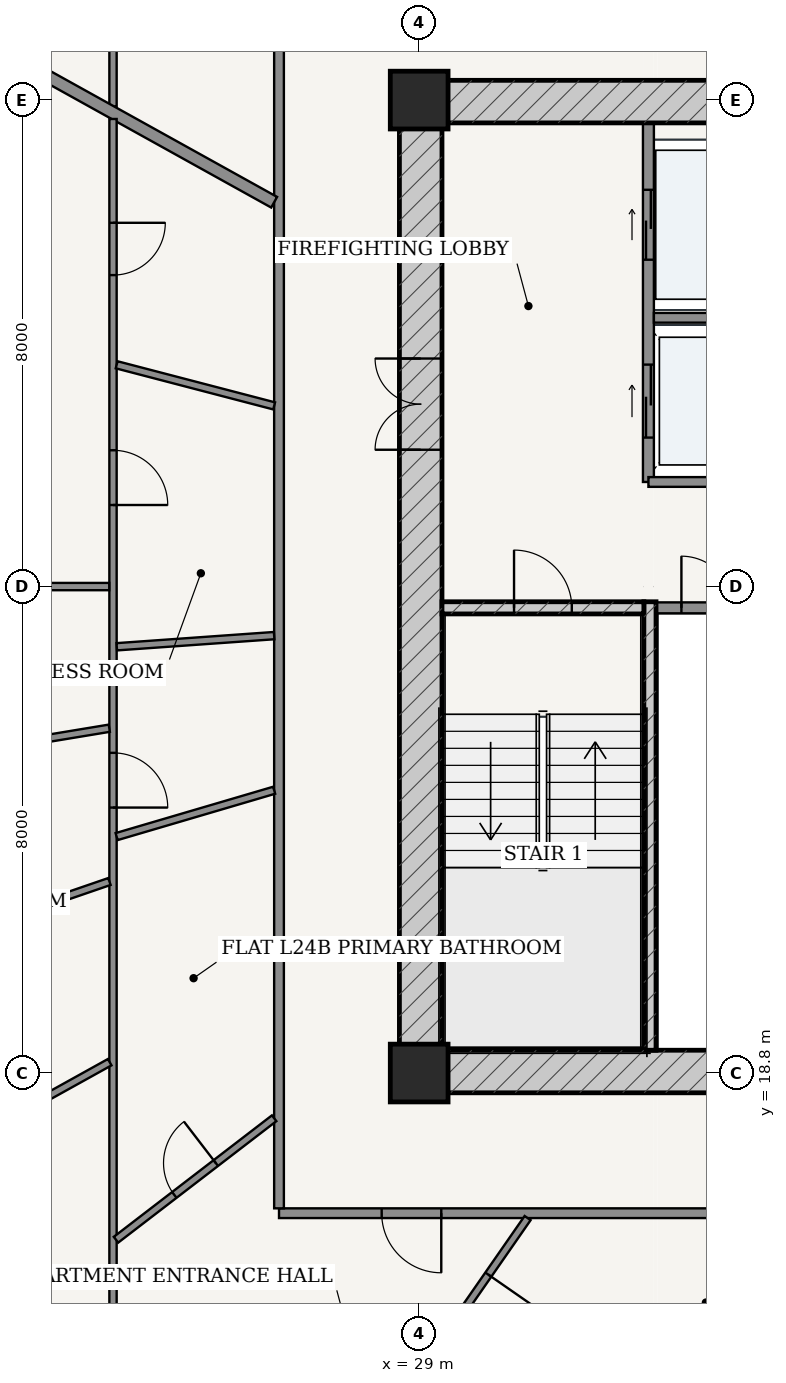
"""IFC4 building model, lengths in metres.
Left out: names, types, materials, properties, quantities, classifications, styles, units other than length and angle.
Written with IfcOpenShell. Run it as: python <this file> out.ifc"""

import sys

from ifc_helpers import new_model, si_unit, direction, frame, frame_2d, origin, origin_2d, place, context, subcontext, project, spatial, rectangle, extrude, source, transform, mapped, element, fill, save


model = new_model("IFC4")
c1 = context("Model", 3, precision=1e-05, world=origin(), true_north=direction((-0.2419218956, 0.970295726276)))
c2 = subcontext(c1, "Body", "Model", "MODEL_VIEW")
j1 = project(units=[si_unit("LENGTHUNIT", "METRE"), si_unit("PLANEANGLEUNIT", "RADIAN")], contexts=[c1])
p1 = place(None, origin())
s1 = spatial("IfcSite", under=j1, at=p1, CompositionType="ELEMENT")
p2 = place(p1, origin())
s2 = spatial("IfcBuilding", under=s1, at=p2, CompositionType="ELEMENT")
p3 = place(p2, frame((0.0, 0.0, 94.2)))
s3 = spatial("IfcBuildingStorey", under=s2, at=p3, CompositionType="ELEMENT", Elevation=94.2)
for number, where, z_axis, x_axis in (
    (1, (29.0, 18.8, 0.0), (0.0, 0.0, 1.0), (1.0, 0.0, 0.0)),
    (2, (29.0, 34.8, 0.0), (0.0, 0.0, 1.0), (1.0, 0.0, 0.0)),
):
    element("IfcColumn", number, at=place(p3, frame(where, z_axis=z_axis, x_axis=x_axis)), inside=s3, PredefinedType="COLUMN", context=c2, shape_type="SweptSolid", body=[
        extrude(rectangle(XDim=0.95, YDim=0.95, at=origin_2d()), origin(), (0.0, 0.0, 1.0), 3.6),
    ])
p4 = place(p3, frame((28.675, 18.825, 0.0), z_axis=(0.0, 0.0, 1.0), x_axis=(1.0, 0.0, 0.0)))
e3 = element("IfcWall", 3, at=p4, inside=s3, PredefinedType="SHEAR", context=c2, shape_type="SweptSolid", body=[
    extrude(rectangle(XDim=18.65, YDim=0.7, at=frame_2d((9.325, 0.0))), origin(), (0.0, 0.0, 1.0), 3.325),
])
p5 = place(p4, frame((8.9, 0.0, 0.0)))
e4 = element("IfcOpeningElement", 4, at=p5, cuts=e3, PredefinedType="OPENING", context=c2, shape_type="SweptSolid", body=[
    extrude(rectangle(XDim=0.85, YDim=2.1, at=frame_2d((0.425, 1.05))), frame((0.0, 0.36, 0.0), z_axis=(0.0, -1.0, 0.0), x_axis=(1.0, 0.0, 0.0)), (0.0, 0.0, 1.0), 0.72),
])
p6 = place(p3, frame((28.675, 34.775, 0.0), z_axis=(0.0, 0.0, 1.0), x_axis=(1.0, 0.0, 0.0)))
e5 = element("IfcWall", 5, at=p6, inside=s3, PredefinedType="SHEAR", context=c2, shape_type="SweptSolid", body=[
    extrude(rectangle(XDim=18.65, YDim=0.7, at=frame_2d((9.325, 0.0))), origin(), (0.0, 0.0, 1.0), 3.325),
])
p7 = place(p6, frame((8.9, 0.0, 0.0)))
e6 = element("IfcOpeningElement", 6, at=p7, cuts=e5, PredefinedType="OPENING", context=c2, shape_type="SweptSolid", body=[
    extrude(rectangle(XDim=0.85, YDim=2.1, at=frame_2d((0.425, 1.05))), frame((0.0, 0.36, 0.0), z_axis=(0.0, -1.0, 0.0), x_axis=(1.0, 0.0, 0.0)), (0.0, 0.0, 1.0), 0.72),
])
p8 = place(p3, frame((29.025, 19.175, 0.0), z_axis=(0.0, 0.0, 1.0), x_axis=(0.0, 1.0, 0.0)))
e7 = element("IfcWall", 7, at=p8, inside=s3, PredefinedType="SHEAR", context=c2, shape_type="SweptSolid", body=[
    extrude(rectangle(XDim=15.25, YDim=0.7, at=frame_2d((7.625, 0.0))), origin(), (0.0, 0.0, 1.0), 3.325),
])
p9 = place(p8, frame((9.875, 0.0, 0.0)))
e8 = element("IfcOpeningElement", 8, at=p9, cuts=e7, PredefinedType="OPENING", context=c2, shape_type="SweptSolid", body=[
    extrude(rectangle(XDim=1.5, YDim=2.2, at=frame_2d((0.75, 1.1))), frame((0.0, 0.36, 0.0), z_axis=(0.0, -1.0, 0.0), x_axis=(1.0, 0.0, 0.0)), (0.0, 0.0, 1.0), 0.72),
])
p10 = place(p3, frame((32.795, 19.175, 0.0), z_axis=(0.0, 0.0, 1.0), x_axis=(0.0, 1.0, 0.0)))
e9 = element("IfcWall", 9, at=p10, inside=s3, PredefinedType="SOLIDWALL", context=c2, shape_type="SweptSolid", body=[
    extrude(rectangle(XDim=7.375, YDim=0.2, at=frame_2d((3.688, 0.0))), origin(), (0.0, 0.0, 1.0), 3.325),
])
p11 = place(p3, frame((29.375, 26.45, 0.0), z_axis=(0.0, 0.0, 1.0), x_axis=(1.0, 0.0, 0.0)))
e10 = element("IfcWall", 10, at=p11, inside=s3, PredefinedType="SOLIDWALL", context=c2, shape_type="SweptSolid", body=[
    extrude(rectangle(XDim=3.32, YDim=0.2, at=frame_2d((1.66, 0.0))), origin(), (0.0, 0.0, 1.0), 3.325),
])
p12 = place(p11, frame((1.185, 0.0, 0.0)))
e11 = element("IfcOpeningElement", 11, at=p12, cuts=e10, PredefinedType="OPENING", context=c2, shape_type="SweptSolid", body=[
    extrude(rectangle(XDim=0.95, YDim=2.15, at=frame_2d((0.475, 1.075))), frame((0.0, 0.11, 0.0), z_axis=(0.0, -1.0, 0.0), x_axis=(1.0, 0.0, 0.0)), (0.0, 0.0, 1.0), 0.22),
])
p13 = place(p3, frame((32.9, 26.45, 0.0), z_axis=(0.0, 0.0, 1.0), x_axis=(1.0, 0.0, 0.0)))
e12 = element("IfcWall", 12, at=p13, inside=s3, PredefinedType="PARTITIONING", context=c2, shape_type="SweptSolid", body=[
    extrude(rectangle(XDim=1.675, YDim=0.18, at=frame_2d((0.837, 0.0))), origin(), (0.0, 0.0, 1.0), 3.325),
])
p14 = place(p13, frame((0.413, 0.0, 0.0)))
e13 = element("IfcOpeningElement", 13, at=p14, cuts=e12, PredefinedType="OPENING", context=c2, shape_type="SweptSolid", body=[
    extrude(rectangle(XDim=0.85, YDim=2.1, at=frame_2d((0.425, 1.05))), frame((0.0, 0.1, 0.0), z_axis=(0.0, -1.0, 0.0), x_axis=(1.0, 0.0, 0.0)), (0.0, 0.0, 1.0), 0.2),
])
p15 = place(p3, frame((32.77, 28.52, 0.0), z_axis=(0.0, 0.0, 1.0), x_axis=(0.0, 1.0, 0.0)))
e14 = element("IfcWall", 14, at=p15, inside=s3, PredefinedType="PARTITIONING", context=c2, shape_type="SweptSolid", body=[
    extrude(rectangle(XDim=5.905, YDim=0.18, at=frame_2d((2.953, 0.0))), origin(), (0.0, 0.0, 1.0), 3.325),
])
p16 = place(p15, frame((3.655, 0.0, 0.0)))
e15 = element("IfcOpeningElement", 15, at=p16, cuts=e14, PredefinedType="OPENING", context=c2, shape_type="SweptSolid", body=[
    extrude(rectangle(XDim=1.15, YDim=2.2, at=frame_2d((0.575, 1.1))), frame((0.0, 0.1, 0.0), z_axis=(0.0, -1.0, 0.0), x_axis=(1.0, 0.0, 0.0)), (0.0, 0.0, 1.0), 0.2),
])
p17 = place(p15, frame((0.73, 0.0, 0.0)))
e16 = element("IfcOpeningElement", 16, at=p17, cuts=e14, PredefinedType="OPENING", context=c2, shape_type="SweptSolid", body=[
    extrude(rectangle(XDim=1.2, YDim=2.25, at=frame_2d((0.6, 1.125))), frame((0.0, 0.1, 0.0), z_axis=(0.0, -1.0, 0.0), x_axis=(1.0, 0.0, 0.0)), (0.0, 0.0, 1.0), 0.2),
])
p18 = place(p3, frame((32.86, 31.22, 0.0), z_axis=(0.0, 0.0, 1.0), x_axis=(1.0, 0.0, 0.0)))
e17 = element("IfcWall", 17, at=p18, inside=s3, PredefinedType="PARTITIONING", context=c2, shape_type="SweptSolid", body=[
    extrude(rectangle(XDim=1.715, YDim=0.16, at=frame_2d((0.857, 0.0))), origin(), (0.0, 0.0, 1.0), 3.325),
])
p19 = place(p3, frame((32.77, 28.52, 0.0), z_axis=(0.0, 0.0, 1.0), x_axis=(1.0, 0.0, 0.0)))
e18 = element("IfcWall", 18, at=p19, inside=s3, PredefinedType="PARTITIONING", context=c2, shape_type="SweptSolid", body=[
    extrude(rectangle(XDim=1.805, YDim=0.16, at=frame_2d((0.902, 0.0))), origin(), (0.0, 0.0, 1.0), 3.325),
])
p20 = place(p3, frame((26.695, 16.495, 0.0), z_axis=(0.0, 0.0, 1.0), x_axis=(1.0, 0.0, 0.0)))
e19 = element("IfcWall", 19, at=p20, inside=s3, PredefinedType="PARTITIONING", context=c2, shape_type="SweptSolid", body=[
    extrude(rectangle(XDim=22.61, YDim=0.16, at=frame_2d((11.305, 0.0))), origin(), (0.0, 0.0, 1.0), 2.767),
])
p21 = place(p20, frame((1.688, 0.0, 0.0)))
e20 = element("IfcOpeningElement", 20, at=p21, cuts=e19, PredefinedType="OPENING", context=c2, shape_type="SweptSolid", body=[
    extrude(rectangle(XDim=0.98, YDim=2.2, at=frame_2d((0.49, 1.1))), frame((0.0, 0.09, 0.0), z_axis=(0.0, -1.0, 0.0), x_axis=(1.0, 0.0, 0.0)), (0.0, 0.0, 1.0), 0.18),
])
p22 = place(p20, frame((16.137, 0.0, 0.0)))
e21 = element("IfcOpeningElement", 21, at=p22, cuts=e19, PredefinedType="OPENING", context=c2, shape_type="SweptSolid", body=[
    extrude(rectangle(XDim=0.98, YDim=2.2, at=frame_2d((0.49, 1.1))), frame((0.0, 0.09, 0.0), z_axis=(0.0, -1.0, 0.0), x_axis=(1.0, 0.0, 0.0)), (0.0, 0.0, 1.0), 0.18),
])
p23 = place(p3, frame((26.695, 16.575, 0.0), z_axis=(0.0, 0.0, 1.0), x_axis=(0.0, 1.0, 0.0)))
e22 = element("IfcWall", 22, at=p23, inside=s3, PredefinedType="PARTITIONING", context=c2, shape_type="SweptSolid", body=[
    extrude(rectangle(XDim=20.45, YDim=0.16, at=frame_2d((10.225, 0.0))), origin(), (0.0, 0.0, 1.0), 2.767),
])
p24 = place(p3, frame((23.965, 34.693, 0.0), z_axis=(0.0, 0.0, 1.0), x_axis=(0.0, 1.0, 0.0)))
e23 = element("IfcWall", 23, at=p24, inside=s3, PredefinedType="PARTITIONING", context=c2, shape_type="SweptSolid", body=[
    extrude(rectangle(XDim=5.142, YDim=0.12, at=frame_2d((2.571, 0.0))), origin(), (0.0, 0.0, 1.0), 3.004),
])
p25 = place(p3, frame((26.615, 33.12, 0.0), z_axis=(0.0, 0.0, 1.0), x_axis=(-0.874319192772, 0.485351366692, 0.0)))
e24 = element("IfcWall", 24, at=p25, inside=s3, PredefinedType="PARTITIONING", context=c2, shape_type="SweptSolid", body=[
    extrude(rectangle(XDim=12.158, YDim=0.2, at=frame_2d((6.079, 0.0))), origin(), (0.0, 0.0, 1.0), 2.767),
])
p26 = place(p3, frame((23.965, 13.765, 0.0), z_axis=(0.0, 0.0, 1.0), x_axis=(0.0, 1.0, 0.0)))
e25 = element("IfcWall", 25, at=p26, inside=s3, PredefinedType="PARTITIONING", context=c2, shape_type="SweptSolid", body=[
    extrude(rectangle(XDim=20.725, YDim=0.12, at=frame_2d((10.362, 0.0))), origin(), (0.0, 0.0, 1.0), 2.767),
])
p27 = place(p26, frame((9.401, 0.0, 0.0)))
e26 = element("IfcOpeningElement", 26, at=p27, cuts=e25, PredefinedType="OPENING", context=c2, shape_type="SweptSolid", body=[
    extrude(rectangle(XDim=0.9, YDim=2.15, at=frame_2d((0.45, 1.075))), frame((0.0, 0.07, 0.0), z_axis=(0.0, -1.0, 0.0), x_axis=(1.0, 0.0, 0.0)), (0.0, 0.0, 1.0), 0.14),
])
p28 = place(p26, frame((18.157, 0.0, 0.0)))
e27 = element("IfcOpeningElement", 27, at=p28, cuts=e25, PredefinedType="OPENING", context=c2, shape_type="SweptSolid", body=[
    extrude(rectangle(XDim=0.86, YDim=2.15, at=frame_2d((0.43, 1.075))), frame((0.0, 0.07, 0.0), z_axis=(0.0, -1.0, 0.0), x_axis=(1.0, 0.0, 0.0)), (0.0, 0.0, 1.0), 0.14),
])
p29 = place(p26, frame((14.376, 0.0, 0.0)))
e28 = element("IfcOpeningElement", 28, at=p29, cuts=e25, PredefinedType="OPENING", context=c2, shape_type="SweptSolid", body=[
    extrude(rectangle(XDim=0.9, YDim=2.15, at=frame_2d((0.45, 1.075))), frame((0.0, 0.07, 0.0), z_axis=(0.0, -1.0, 0.0), x_axis=(1.0, 0.0, 0.0)), (0.0, 0.0, 1.0), 0.14),
])
p30 = place(p3, frame((23.903, 26.8, 0.0), z_axis=(0.0, 0.0, 1.0), x_axis=(-1.0, 0.0, 0.0)))
e29 = element("IfcWall", 29, at=p30, inside=s3, PredefinedType="PARTITIONING", context=c2, shape_type="SweptSolid", body=[
    extrude(rectangle(XDim=12.443, YDim=0.12, at=frame_2d((6.222, 0.0))), origin(), (0.0, 0.0, 1.0), 2.767),
])
p31 = place(p30, frame((5.771, 0.0, 0.0)))
e30 = element("IfcOpeningElement", 30, at=p31, cuts=e29, PredefinedType="OPENING", context=c2, shape_type="SweptSolid", body=[
    extrude(rectangle(XDim=0.9, YDim=2.15, at=frame_2d((0.45, 1.075))), frame((0.0, 0.07, 0.0), z_axis=(0.0, -1.0, 0.0), x_axis=(1.0, 0.0, 0.0)), (0.0, 0.0, 1.0), 0.14),
])
p32 = place(p3, frame((23.904, 24.47, 0.0), z_axis=(0.0, 0.0, 1.0), x_axis=(-0.986618264768, -0.163047231274, 0.0)))
e31 = element("IfcWall", 31, at=p32, inside=s3, PredefinedType="PARTITIONING", context=c2, shape_type="SweptSolid", body=[
    extrude(rectangle(XDim=12.039, YDim=0.12, at=frame_2d((6.02, 0.0))), origin(), (0.0, 0.0, 1.0), 2.767),
])
p33 = place(p32, frame((4.496, 0.0, 0.0)))
e32 = element("IfcOpeningElement", 32, at=p33, cuts=e31, PredefinedType="OPENING", context=c2, shape_type="SweptSolid", body=[
    extrude(rectangle(XDim=0.9, YDim=2.15, at=frame_2d((0.45, 1.075))), frame((0.0, 0.07, 0.0), z_axis=(0.0, -1.0, 0.0), x_axis=(1.0, 0.0, 0.0)), (0.0, 0.0, 1.0), 0.14),
])
p34 = place(p3, frame((23.906, 21.95, 0.0), z_axis=(0.0, 0.0, 1.0), x_axis=(-0.945573120726, -0.32540970078, 0.0)))
e33 = element("IfcWall", 33, at=p34, inside=s3, PredefinedType="PARTITIONING", context=c2, shape_type="SweptSolid", body=[
    extrude(rectangle(XDim=11.022, YDim=0.12, at=frame_2d((5.511, 0.0))), origin(), (0.0, 0.0, 1.0), 2.767),
])
p35 = place(p34, frame((5.061, 0.0, 0.0)))
e34 = element("IfcOpeningElement", 34, at=p35, cuts=e33, PredefinedType="OPENING", context=c2, shape_type="SweptSolid", body=[
    extrude(rectangle(XDim=0.9, YDim=2.15, at=frame_2d((0.45, 1.075))), frame((0.0, 0.07, 0.0), z_axis=(0.0, -1.0, 0.0), x_axis=(1.0, 0.0, 0.0)), (0.0, 0.0, 1.0), 0.14),
])
p36 = place(p3, frame((23.911, 18.979, 0.0), z_axis=(0.0, 0.0, 1.0), x_axis=(-0.874313476423, -0.485361664066, 0.0)))
e35 = element("IfcWall", 35, at=p36, inside=s3, PredefinedType="PARTITIONING", context=c2, shape_type="SweptSolid", body=[
    extrude(rectangle(XDim=9.066, YDim=0.12, at=frame_2d((4.533, 0.0))), origin(), (0.0, 0.0, 1.0), 2.767),
])
p37 = place(p36, frame((3.016, 0.0, 0.0)))
e36 = element("IfcOpeningElement", 36, at=p37, cuts=e35, PredefinedType="OPENING", context=c2, shape_type="SweptSolid", body=[
    extrude(rectangle(XDim=0.9, YDim=2.15, at=frame_2d((0.45, 1.075))), frame((0.0, 0.07, 0.0), z_axis=(0.0, -1.0, 0.0), x_axis=(1.0, 0.0, 0.0)), (0.0, 0.0, 1.0), 0.14),
])
p38 = place(p3, frame((26.615, 29.771, 0.0), z_axis=(0.0, 0.0, 1.0), x_axis=(-0.967585302816, 0.252544415449, 0.0)))
e37 = element("IfcWall", 37, at=p38, inside=s3, PredefinedType="PARTITIONING", context=c2, shape_type="SweptSolid", body=[
    extrude(rectangle(XDim=2.677, YDim=0.12, at=frame_2d((1.338, 0.0))), origin(), (0.0, 0.0, 1.0), 3.325),
])
p39 = place(p3, frame((26.615, 25.993, 0.0), z_axis=(0.0, 0.0, 1.0), x_axis=(-0.997500084777, -0.070665273433, 0.0)))
e38 = element("IfcWall", 38, at=p39, inside=s3, PredefinedType="PARTITIONING", context=c2, shape_type="SweptSolid", body=[
    extrude(rectangle(XDim=2.595, YDim=0.12, at=frame_2d((1.297, 0.0))), origin(), (0.0, 0.0, 1.0), 3.325),
])
p40 = place(p3, frame((26.615, 23.45, 0.0), z_axis=(0.0, 0.0, 1.0), x_axis=(-0.959338143787, -0.282259323806, 0.0)))
e39 = element("IfcWall", 39, at=p40, inside=s3, PredefinedType="PARTITIONING", context=c2, shape_type="SweptSolid", body=[
    extrude(rectangle(XDim=2.7, YDim=0.12, at=frame_2d((1.35, 0.0))), origin(), (0.0, 0.0, 1.0), 3.325),
])
p41 = place(p3, frame((26.615, 18.056, 0.0), z_axis=(0.0, 0.0, 1.0), x_axis=(-0.79311360735, -0.609073727751, 0.0)))
e40 = element("IfcWall", 40, at=p41, inside=s3, PredefinedType="PARTITIONING", context=c2, shape_type="SweptSolid", body=[
    extrude(rectangle(XDim=3.279, YDim=0.12, at=frame_2d((1.64, 0.0))), origin(), (0.0, 0.0, 1.0), 3.004),
])
p42 = place(p41, frame((1.21, 0.0, 0.0)))
e41 = element("IfcOpeningElement", 41, at=p42, cuts=e40, PredefinedType="OPENING", context=c2, shape_type="SweptSolid", body=[
    extrude(rectangle(XDim=0.86, YDim=2.15, at=frame_2d((0.43, 1.075))), frame((0.0, 0.07, 0.0), z_axis=(0.0, -1.0, 0.0), x_axis=(1.0, 0.0, 0.0)), (0.0, 0.0, 1.0), 0.14),
])
p43 = place(p3, frame((30.783, 16.415, 0.0), z_axis=(0.0, 0.0, 1.0), x_axis=(-0.570653089326, -0.821191239385, 0.0)))
e42 = element("IfcWall", 42, at=p43, inside=s3, PredefinedType="PARTITIONING", context=c2, shape_type="SweptSolid", body=[
    extrude(rectangle(XDim=3.165, YDim=0.12, at=frame_2d((1.583, 0.0))), origin(), (0.0, 0.0, 1.0), 3.004),
])
p44 = place(p43, frame((1.133, 0.0, 0.0)))
e43 = element("IfcOpeningElement", 43, at=p44, cuts=e42, PredefinedType="OPENING", context=c2, shape_type="SweptSolid", body=[
    extrude(rectangle(XDim=0.9, YDim=2.15, at=frame_2d((0.45, 1.075))), frame((0.0, 0.07, 0.0), z_axis=(0.0, -1.0, 0.0), x_axis=(1.0, 0.0, 0.0)), (0.0, 0.0, 1.0), 0.14),
])
p45 = place(p3, frame((35.514, 16.415, 0.0), z_axis=(0.0, 0.0, 1.0), x_axis=(-0.232829417917, -0.972517589636, 0.0)))
e44 = element("IfcWall", 44, at=p45, inside=s3, PredefinedType="PARTITIONING", context=c2, shape_type="SweptSolid", body=[
    extrude(rectangle(XDim=11.502, YDim=0.2, at=frame_2d((5.751, 0.0))), origin(), (0.0, 0.0, 1.0), 2.767),
])
m1 = source(origin(), c2, "Body", "SweptSolid", [
    extrude(rectangle(XDim=1.5, YDim=2.2, at=frame_2d((0.75, 1.1))), frame((0.0, 0.025, 0.0), z_axis=(0.0, -1.0, 0.0), x_axis=(1.0, 0.0, 0.0)), (0.0, 0.0, 1.0), 0.05),
])
p46 = place(p9, origin())
e45 = element("IfcDoor", 45, at=p46, inside=s3, OperationType="DOUBLE_DOOR_SINGLE_SWING", PredefinedType="DOOR", context=c2, shape_type="MappedRepresentation", body=[
    mapped(m1, transform((0.0, 0.0, 0.0), scale=1.0)),
])
fill(e8, e45)
m2 = source(origin(), c2, "Body", "SweptSolid", [
    extrude(rectangle(XDim=0.95, YDim=2.15, at=frame_2d((0.475, 1.075))), frame((0.0, 0.025, 0.0), z_axis=(0.0, -1.0, 0.0), x_axis=(1.0, 0.0, 0.0)), (0.0, 0.0, 1.0), 0.05),
])
p47 = place(p12, origin())
e46 = element("IfcDoor", 46, at=p47, inside=s3, OperationType="SINGLE_SWING_LEFT", PredefinedType="DOOR", context=c2, shape_type="MappedRepresentation", body=[
    mapped(m2, transform((0.0, 0.0, 0.0), scale=1.0)),
])
fill(e11, e46)
m3 = source(origin(), c2, "Body", "SweptSolid", [
    extrude(rectangle(XDim=0.85, YDim=2.1, at=frame_2d((0.425, 1.05))), frame((0.0, 0.025, 0.0), z_axis=(0.0, -1.0, 0.0), x_axis=(1.0, 0.0, 0.0)), (0.0, 0.0, 1.0), 0.05),
])
p48 = place(p14, origin())
e47 = element("IfcDoor", 47, at=p48, inside=s3, OperationType="SINGLE_SWING_LEFT", PredefinedType="DOOR", context=c2, shape_type="MappedRepresentation", body=[
    mapped(m3, transform((0.0, 0.0, 0.0), scale=1.0)),
])
fill(e13, e47)
m4 = source(origin(), c2, "Body", "SweptSolid", [
    extrude(rectangle(XDim=1.15, YDim=2.2, at=frame_2d((0.575, 1.1))), frame((0.0, 0.025, 0.0), z_axis=(0.0, -1.0, 0.0), x_axis=(1.0, 0.0, 0.0)), (0.0, 0.0, 1.0), 0.05),
])
p49 = place(p16, origin())
e48 = element("IfcDoor", 48, at=p49, inside=s3, OperationType="DOUBLE_DOOR_SLIDING", PredefinedType="DOOR", context=c2, shape_type="MappedRepresentation", body=[
    mapped(m4, transform((0.0, 0.0, 0.0), scale=1.0)),
])
fill(e15, e48)
m5 = source(origin(), c2, "Body", "SweptSolid", [
    extrude(rectangle(XDim=1.2, YDim=2.25, at=frame_2d((0.6, 1.125))), frame((0.0, 0.025, 0.0), z_axis=(0.0, -1.0, 0.0), x_axis=(1.0, 0.0, 0.0)), (0.0, 0.0, 1.0), 0.05),
])
p50 = place(p17, origin())
e49 = element("IfcDoor", 49, at=p50, inside=s3, OperationType="DOUBLE_DOOR_SLIDING", PredefinedType="DOOR", context=c2, shape_type="MappedRepresentation", body=[
    mapped(m5, transform((0.0, 0.0, 0.0), scale=1.0)),
])
fill(e16, e49)
m6 = source(origin(), c2, "Body", "SweptSolid", [
    extrude(rectangle(XDim=0.98, YDim=2.2, at=frame_2d((0.49, 1.1))), frame((0.0, 0.025, 0.0), z_axis=(0.0, -1.0, 0.0), x_axis=(1.0, 0.0, 0.0)), (0.0, 0.0, 1.0), 0.05),
])
p51 = place(p21, frame((0.98, 0.0, 0.0), z_axis=(0.0, 0.0, 1.0), x_axis=(-1.0, 0.0, 0.0)))
e50 = element("IfcDoor", 50, at=p51, inside=s3, OperationType="SINGLE_SWING_LEFT", PredefinedType="DOOR", context=c2, shape_type="MappedRepresentation", body=[
    mapped(m6, transform((0.0, 0.0, 0.0), scale=1.0)),
])
fill(e20, e50)
m7 = source(origin(), c2, "Body", "SweptSolid", [
    extrude(rectangle(XDim=0.86, YDim=2.15, at=frame_2d((0.43, 1.075))), frame((0.0, 0.025, 0.0), z_axis=(0.0, -1.0, 0.0), x_axis=(1.0, 0.0, 0.0)), (0.0, 0.0, 1.0), 0.05),
])
p52 = place(p42, frame((0.86, 0.0, 0.0), z_axis=(0.0, 0.0, 1.0), x_axis=(-1.0, 0.0, 0.0)))
e51 = element("IfcDoor", 51, at=p52, inside=s3, OperationType="SINGLE_SWING_RIGHT", PredefinedType="DOOR", context=c2, shape_type="MappedRepresentation", body=[
    mapped(m7, transform((0.0, 0.0, 0.0), scale=1.0)),
])
fill(e41, e51)
m8 = source(origin(), c2, "Body", "SweptSolid", [
    extrude(rectangle(XDim=0.9, YDim=2.15, at=frame_2d((0.45, 1.075))), frame((0.0, 0.025, 0.0), z_axis=(0.0, -1.0, 0.0), x_axis=(1.0, 0.0, 0.0)), (0.0, 0.0, 1.0), 0.05),
])
p53 = place(p44, origin())
e52 = element("IfcDoor", 52, at=p53, inside=s3, OperationType="SINGLE_SWING_LEFT", PredefinedType="DOOR", context=c2, shape_type="MappedRepresentation", body=[
    mapped(m8, transform((0.0, 0.0, 0.0), scale=1.0)),
])
fill(e43, e52)
p54 = place(p27, frame((0.9, 0.0, 0.0), z_axis=(0.0, 0.0, 1.0), x_axis=(-1.0, 0.0, 0.0)))
e53 = element("IfcDoor", 53, at=p54, inside=s3, OperationType="SINGLE_SWING_RIGHT", PredefinedType="DOOR", context=c2, shape_type="MappedRepresentation", body=[
    mapped(m8, transform((0.0, 0.0, 0.0), scale=1.0)),
])
fill(e26, e53)
p55 = place(p28, frame((0.86, 0.0, 0.0), z_axis=(0.0, 0.0, 1.0), x_axis=(-1.0, 0.0, 0.0)))
e54 = element("IfcDoor", 54, at=p55, inside=s3, OperationType="SINGLE_SWING_LEFT", PredefinedType="DOOR", context=c2, shape_type="MappedRepresentation", body=[
    mapped(m7, transform((0.0, 0.0, 0.0), scale=1.0)),
])
fill(e27, e54)
p56 = place(p29, frame((0.9, 0.0, 0.0), z_axis=(0.0, 0.0, 1.0), x_axis=(-1.0, 0.0, 0.0)))
e55 = element("IfcDoor", 55, at=p56, inside=s3, OperationType="SINGLE_SWING_RIGHT", PredefinedType="DOOR", context=c2, shape_type="MappedRepresentation", body=[
    mapped(m8, transform((0.0, 0.0, 0.0), scale=1.0)),
])
fill(e28, e55)
save(model, sys.argv[1])
